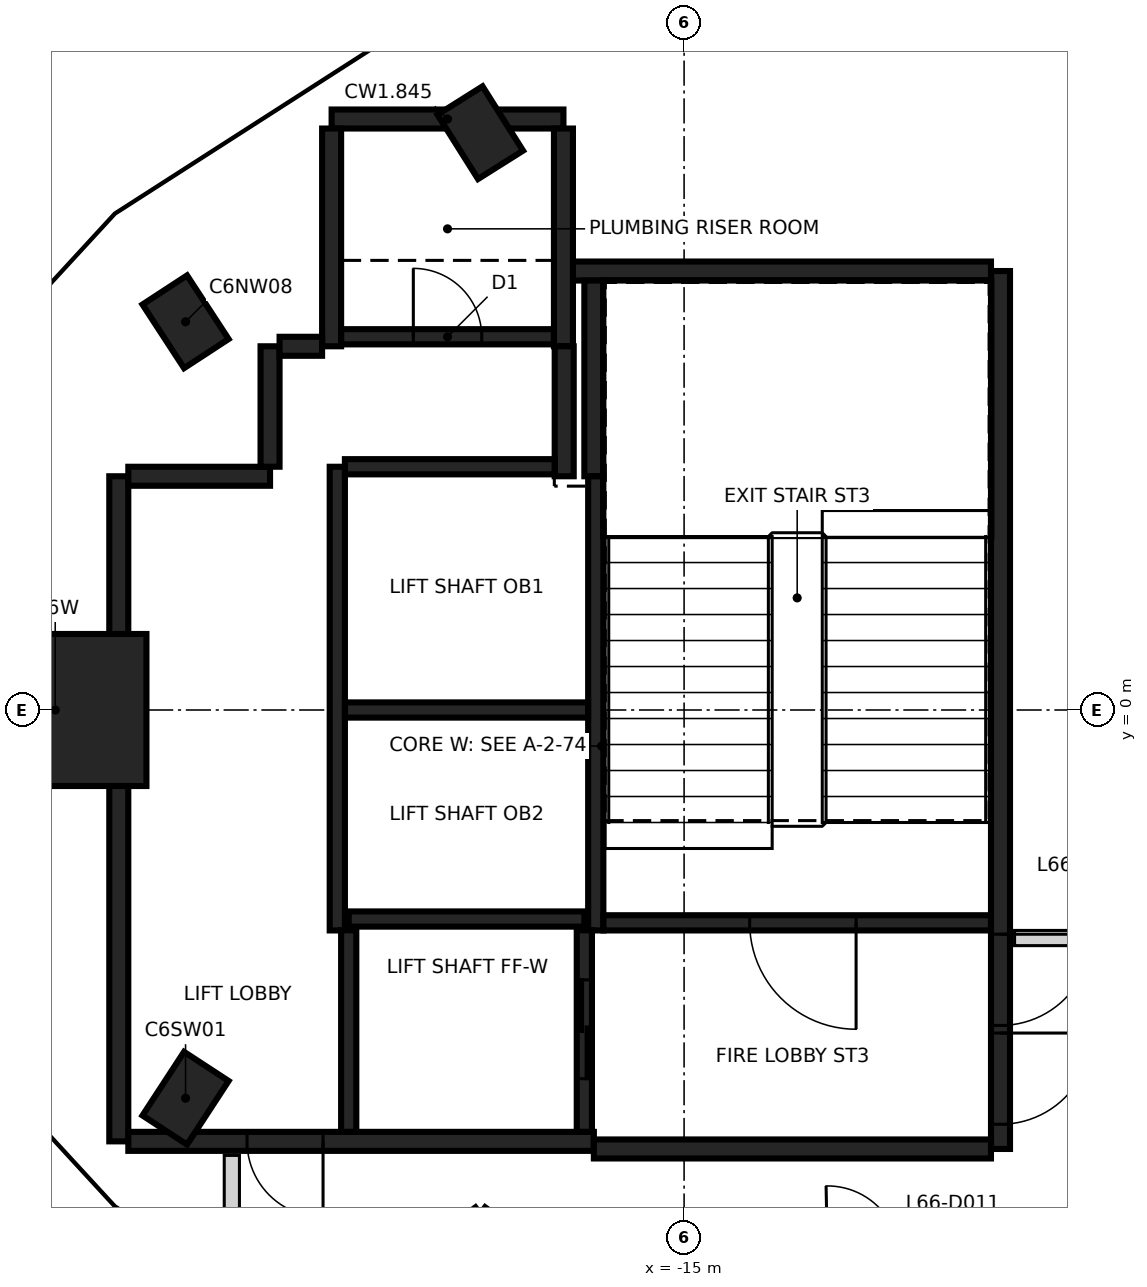
"""IFC4 building model, lengths in metres.
Left out: names, types, materials, properties, quantities, classifications, styles, units other than length and angle.
Written with IfcOpenShell. Run it as: python <this file> out.ifc"""

import sys

from ifc_helpers import new_model, si_unit, direction, frame, frame_2d, origin, origin_2d, place, context, subcontext, project, spatial, rectangle, extrude, element, fill, save


model = new_model("IFC4")
c1 = context("Model", 3, precision=1e-05, world=origin(), true_north=direction((0.0, 1.0)))
c2 = subcontext(c1, "Body", "Model", "MODEL_VIEW")
j1 = project(units=[si_unit("LENGTHUNIT", "METRE"), si_unit("PLANEANGLEUNIT", "RADIAN")], contexts=[c1])
p1 = place(None, origin())
s1 = spatial("IfcSite", under=j1, at=p1, CompositionType="ELEMENT")
p2 = place(p1, origin())
s2 = spatial("IfcBuilding", under=s1, at=p2, CompositionType="ELEMENT")
p3 = place(p2, frame((0.0, 0.0, 262.2)))
s3 = spatial("IfcBuildingStorey", under=s2, at=p3, CompositionType="ELEMENT", Elevation=262.2)
for number, where, z_axis, x_axis in (
    (1, (-17.681, 7.595, -0.35), (0.0, 0.0, 1.0), (-0.533, 0.846, 0.0)),
    (2, (-21.559, 5.107, -0.35), (0.0, 0.0, 1.0), (-0.547, 0.837, 0.0)),
    (3, (-21.559, -5.107, -0.35), (0.0, 0.0, 1.0), (0.547, 0.837, 0.0)),
):
    element("IfcColumn", number, at=place(p3, frame(where, z_axis=z_axis, x_axis=x_axis)), inside=s3, PredefinedType="COLUMN", context=c2, shape_type="SweptSolid", body=[
        extrude(rectangle(XDim=1.0, YDim=0.7, at=origin_2d()), origin(), (0.0, 0.0, 1.0), 3.6),
    ])
p4 = place(p3, frame((-23.273, 0.0, -0.35), z_axis=(0.0, 0.0, 1.0), x_axis=(1.0, 0.0, 0.0)))
e4 = element("IfcColumn", 4, at=p4, inside=s3, PredefinedType="COLUMN", context=c2, shape_type="SweptSolid", body=[
    extrude(rectangle(XDim=2.4, YDim=2.0, at=origin_2d()), origin(), (0.0, 0.0, 1.0), 3.6),
])
p5 = place(p3, frame((-10.837, 5.775, 0.0), z_axis=(0.0, 0.0, 1.0), x_axis=(0.0, -1.0, 0.0)))
e5 = element("IfcWall", 5, at=p5, inside=s3, PredefinedType="SHEAR", context=c2, shape_type="SweptSolid", body=[
    extrude(rectangle(XDim=11.55, YDim=0.25, at=frame_2d((5.775, 0.0))), origin(), (0.0, 0.0, 1.0), 3.25),
])
p6 = place(p5, frame((10.025, 0.0, 0.0)))
e6 = element("IfcOpeningElement", 6, at=p6, cuts=e5, PredefinedType="OPENING", context=c2, shape_type="SweptSolid", body=[
    extrude(rectangle(XDim=1.2, YDim=2.1, at=frame_2d((0.6, 1.05))), frame((0.0, 0.135, 0.0), z_axis=(0.0, -1.0, 0.0), x_axis=(1.0, 0.0, 0.0)), (0.0, 0.0, 1.0), 0.27),
])
p7 = place(p5, frame((8.725, 0.0, 0.0)))
e7 = element("IfcOpeningElement", 7, at=p7, cuts=e5, PredefinedType="OPENING", context=c2, shape_type="SweptSolid", body=[
    extrude(rectangle(XDim=1.2, YDim=2.1, at=frame_2d((0.6, 1.05))), frame((0.0, 0.135, 0.0), z_axis=(0.0, -1.0, 0.0), x_axis=(1.0, 0.0, 0.0)), (0.0, 0.0, 1.0), 0.27),
])
p8 = place(p3, frame((-22.437, -5.675, 0.0), z_axis=(0.0, 0.0, 1.0), x_axis=(0.0, 1.0, 0.0)))
e8 = element("IfcWall", 8, at=p8, inside=s3, PredefinedType="SHEAR", context=c2, shape_type="SweptSolid", body=[
    extrude(rectangle(XDim=8.75, YDim=0.25, at=frame_2d((4.375, 0.0))), origin(), (0.0, 0.0, 1.0), 3.25),
])
p9 = place(p3, frame((-16.187, -5.675, 0.0), z_axis=(0.0, 0.0, 1.0), x_axis=(-1.0, 0.0, 0.0)))
e9 = element("IfcWall", 9, at=p9, inside=s3, PredefinedType="SHEAR", context=c2, shape_type="SweptSolid", body=[
    extrude(rectangle(XDim=6.125, YDim=0.25, at=frame_2d((3.062, 0.0))), origin(), (0.0, 0.0, 1.0), 3.25),
])
p10 = place(p9, frame((3.563, 0.0, 0.0)))
e10 = element("IfcOpeningElement", 10, at=p10, cuts=e9, PredefinedType="OPENING", context=c2, shape_type="SweptSolid", body=[
    extrude(rectangle(XDim=1.0, YDim=2.1, at=frame_2d((0.5, 1.05))), frame((0.0, 0.135, 0.0), z_axis=(0.0, -1.0, 0.0), x_axis=(1.0, 0.0, 0.0)), (0.0, 0.0, 1.0), 0.27),
])
p11 = place(p3, frame((-10.963, -5.775, 0.0), z_axis=(0.0, 0.0, 1.0), x_axis=(-1.0, 0.0, 0.0)))
e11 = element("IfcWall", 11, at=p11, inside=s3, PredefinedType="SHEAR", context=c2, shape_type="SweptSolid", body=[
    extrude(rectangle(XDim=5.225, YDim=0.25, at=frame_2d((2.612, 0.0))), origin(), (0.0, 0.0, 1.0), 3.25),
])
p12 = place(p3, frame((-16.472, 5.775, 0.0), z_axis=(0.0, 0.0, 1.0), x_axis=(1.0, 0.0, 0.0)))
e12 = element("IfcWall", 12, at=p12, inside=s3, PredefinedType="SHEAR", context=c2, shape_type="SweptSolid", body=[
    extrude(rectangle(XDim=5.51, YDim=0.25, at=frame_2d((2.755, 0.0))), origin(), (0.0, 0.0, 1.0), 3.25),
])
p13 = place(p3, frame((-19.637, 7.775, 0.0), z_axis=(0.0, 0.0, 1.0), x_axis=(1.0, 0.0, 0.0)))
e13 = element("IfcWall", 13, at=p13, inside=s3, PredefinedType="SHEAR", context=c2, shape_type="SweptSolid", body=[
    extrude(rectangle(XDim=3.05, YDim=0.25, at=frame_2d((1.525, 0.0))), origin(), (0.0, 0.0, 1.0), 3.25),
])
for number, where, z_axis, x_axis in (
    (14, (-16.587, 7.65, 0.0), (0.0, 0.0, 1.0), (0.0, -1.0, 0.0)),
    (15, (-19.637, 4.785, 0.0), (0.0, 0.0, 1.0), (0.0, 1.0, 0.0)),
):
    element("IfcWall", number, at=place(p3, frame(where, z_axis=z_axis, x_axis=x_axis)), inside=s3, PredefinedType="SHEAR", context=c2, shape_type="SweptSolid", body=[
        extrude(rectangle(XDim=2.865, YDim=0.25, at=frame_2d((1.432, 0.0))), origin(), (0.0, 0.0, 1.0), 3.25),
    ])
p14 = place(p3, frame((-16.187, 3.075, 0.0), z_axis=(0.0, 0.0, 1.0), x_axis=(0.0, 1.0, 0.0)))
e16 = element("IfcWall", 16, at=p14, inside=s3, PredefinedType="SHEAR", context=c2, shape_type="SweptSolid", body=[
    extrude(rectangle(XDim=2.575, YDim=0.25, at=frame_2d((1.287, 0.0))), origin(), (0.0, 0.0, 1.0), 3.25),
])
p15 = place(p3, frame((-22.312, 3.075, 0.0), z_axis=(0.0, 0.0, 1.0), x_axis=(1.0, 0.0, 0.0)))
e17 = element("IfcWall", 17, at=p15, inside=s3, PredefinedType="SHEAR", context=c2, shape_type="SweptSolid", body=[
    extrude(rectangle(XDim=1.865, YDim=0.25, at=frame_2d((0.932, 0.0))), origin(), (0.0, 0.0, 1.0), 3.25),
])
p16 = place(p3, frame((-16.577, 4.785, 0.0), z_axis=(0.0, 0.0, 1.0), x_axis=(0.0, -1.0, 0.0)))
e18 = element("IfcWall", 18, at=p16, inside=s3, PredefinedType="SHEAR", context=c2, shape_type="SweptSolid", body=[
    extrude(rectangle(XDim=1.71, YDim=0.25, at=frame_2d((0.855, 0.0))), origin(), (0.0, 0.0, 1.0), 3.25),
])
p17 = place(p3, frame((-20.447, 3.2, 0.0), z_axis=(0.0, 0.0, 1.0), x_axis=(0.0, 1.0, 0.0)))
e19 = element("IfcWall", 19, at=p17, inside=s3, PredefinedType="SHEAR", context=c2, shape_type="SweptSolid", body=[
    extrude(rectangle(XDim=1.584, YDim=0.25, at=frame_2d((0.792, 0.0))), origin(), (0.0, 0.0, 1.0), 3.25),
])
p18 = place(p3, frame((-20.322, 4.785, 0.0), z_axis=(0.0, 0.0, 1.0), x_axis=(1.0, 0.0, 0.0)))
e20 = element("IfcWall", 20, at=p18, inside=s3, PredefinedType="SHEAR", context=c2, shape_type="SweptSolid", body=[
    extrude(rectangle(XDim=0.559, YDim=0.25, at=frame_2d((0.28, 0.0))), origin(), (0.0, 0.0, 1.0), 3.25),
])
p19 = place(p3, frame((-16.162, 3.074, 0.0), z_axis=(0.0, 0.0, 1.0), x_axis=(0.0, -1.0, 0.0)))
e21 = element("IfcWall", 21, at=p19, inside=s3, PredefinedType="SHEAR", context=c2, shape_type="SweptSolid", body=[
    extrude(rectangle(XDim=5.974, YDim=0.2, at=frame_2d((2.987, 0.0))), origin(), (0.0, 0.0, 1.0), 3.25),
])
p20 = place(p3, frame((-19.562, -2.9, 0.0), z_axis=(0.0, 0.0, 1.0), x_axis=(0.0, 1.0, 0.0)))
e22 = element("IfcWall", 22, at=p20, inside=s3, PredefinedType="SHEAR", context=c2, shape_type="SweptSolid", body=[
    extrude(rectangle(XDim=6.1, YDim=0.2, at=frame_2d((3.05, 0.0))), origin(), (0.0, 0.0, 1.0), 3.25),
])
p21 = place(p3, frame((-10.963, -2.8, 0.0), z_axis=(0.0, 0.0, 1.0), x_axis=(-1.0, 0.0, 0.0)))
e23 = element("IfcWall", 23, at=p21, inside=s3, PredefinedType="SHEAR", context=c2, shape_type="SweptSolid", body=[
    extrude(rectangle(XDim=5.098, YDim=0.2, at=frame_2d((2.549, 0.0))), origin(), (0.0, 0.0, 1.0), 3.25),
])
p22 = place(p21, frame((1.774, 0.0, 0.0)))
e24 = element("IfcOpeningElement", 24, at=p22, cuts=e23, PredefinedType="OPENING", context=c2, shape_type="SweptSolid", body=[
    extrude(rectangle(XDim=1.4, YDim=2.1, at=frame_2d((0.7, 1.05))), frame((0.0, 0.11, 0.0), z_axis=(0.0, -1.0, 0.0), x_axis=(1.0, 0.0, 0.0)), (0.0, 0.0, 1.0), 0.22),
])
p23 = place(p3, frame((-16.263, 0.0, 0.0), z_axis=(0.0, 0.0, 1.0), x_axis=(-1.0, 0.0, 0.0)))
e25 = element("IfcWall", 25, at=p23, inside=s3, PredefinedType="SHEAR", context=c2, shape_type="SweptSolid", body=[
    extrude(rectangle(XDim=3.198, YDim=0.2, at=frame_2d((1.599, 0.0))), origin(), (0.0, 0.0, 1.0), 3.25),
])
p24 = place(p3, frame((-19.511, 4.91, 0.0), z_axis=(0.0, 0.0, 1.0), x_axis=(1.0, 0.0, 0.0)))
e26 = element("IfcWall", 26, at=p24, inside=s3, PredefinedType="SHEAR", context=c2, shape_type="SweptSolid", body=[
    extrude(rectangle(XDim=2.798, YDim=0.2, at=frame_2d((1.399, 0.0))), origin(), (0.0, 0.0, 1.0), 3.25),
])
p25 = place(p24, frame((0.949, 0.0, 0.0)))
e27 = element("IfcOpeningElement", 27, at=p25, cuts=e26, PredefinedType="OPENING", context=c2, shape_type="SweptSolid", body=[
    extrude(rectangle(XDim=0.9, YDim=2.1, at=frame_2d((0.45, 1.05))), frame((0.0, 0.11, 0.0), z_axis=(0.0, -1.0, 0.0), x_axis=(1.0, 0.0, 0.0)), (0.0, 0.0, 1.0), 0.22),
])
p26 = place(p3, frame((-19.462, 3.2, 0.0), z_axis=(0.0, 0.0, 1.0), x_axis=(1.0, 0.0, 0.0)))
e28 = element("IfcWall", 28, at=p26, inside=s3, PredefinedType="SHEAR", context=c2, shape_type="SweptSolid", body=[
    extrude(rectangle(XDim=2.759, YDim=0.2, at=frame_2d((1.379, 0.0))), origin(), (0.0, 0.0, 1.0), 3.25),
])
p27 = place(p3, frame((-19.412, -2.75, 0.0), z_axis=(0.0, 0.0, 1.0), x_axis=(1.0, 0.0, 0.0)))
e29 = element("IfcWall", 29, at=p27, inside=s3, PredefinedType="SHEAR", context=c2, shape_type="SweptSolid", body=[
    extrude(rectangle(XDim=3.1, YDim=0.2, at=frame_2d((1.55, 0.0))), origin(), (0.0, 0.0, 1.0), 3.25),
])
p28 = place(p3, frame((-16.312, -2.898, 0.0), z_axis=(0.0, 0.0, 1.0), x_axis=(0.0, -1.0, 0.0)))
e30 = element("IfcWall", 30, at=p28, inside=s3, PredefinedType="SHEAR", context=c2, shape_type="SweptSolid", body=[
    extrude(rectangle(XDim=2.651, YDim=0.2, at=frame_2d((1.325, 0.0))), origin(), (0.0, 0.0, 1.0), 3.25),
])
p29 = place(p28, frame((0.652, 0.0, 0.0)))
e31 = element("IfcOpeningElement", 31, at=p29, cuts=e30, PredefinedType="OPENING", context=c2, shape_type="SweptSolid", body=[
    extrude(rectangle(XDim=1.3, YDim=2.1, at=frame_2d((0.65, 1.05))), frame((0.0, 0.11, 0.0), z_axis=(0.0, -1.0, 0.0), x_axis=(1.0, 0.0, 0.0)), (0.0, 0.0, 1.0), 0.22),
])
p30 = place(p3, frame((-19.412, -5.549, 0.0), z_axis=(0.0, 0.0, 1.0), x_axis=(0.0, 1.0, 0.0)))
e32 = element("IfcWall", 32, at=p30, inside=s3, PredefinedType="SHEAR", context=c2, shape_type="SweptSolid", body=[
    extrude(rectangle(XDim=2.651, YDim=0.2, at=frame_2d((1.325, 0.0))), origin(), (0.0, 0.0, 1.0), 3.25),
])
p31 = place(p3, frame((-20.95, -6.65, 0.0), z_axis=(0.0, 0.0, 1.0), x_axis=(0.0, 1.0, 0.0)))
e33 = element("IfcWall", 33, at=p31, inside=s3, PredefinedType="PARTITIONING", context=c2, shape_type="SweptSolid", body=[
    extrude(rectangle(XDim=0.79, YDim=0.2, at=frame_2d((0.395, 0.0))), origin(), (0.0, 0.0, 1.0), 3.25),
])
p32 = place(p3, frame((-18.642, -7.319, 0.0), z_axis=(0.0, 0.0, 1.0), x_axis=(0.798707882989, 0.601718968998, 0.0)))
e34 = element("IfcWall", 34, at=p32, inside=s3, PredefinedType="PARTITIONING", context=c2, shape_type="SweptSolid", body=[
    extrude(rectangle(XDim=1.203, YDim=0.2, at=frame_2d((0.602, 0.0))), origin(), (0.0, 0.0, 1.0), 2.35),
])
p33 = place(p3, frame((-17.681, -6.595, 0.0), z_axis=(0.0, 0.0, 1.0), x_axis=(0.810123213102, -0.586259652026, 0.0)))
e35 = element("IfcWall", 35, at=p33, inside=s3, PredefinedType="PARTITIONING", context=c2, shape_type="SweptSolid", body=[
    extrude(rectangle(XDim=1.17, YDim=0.2, at=frame_2d((0.585, 0.0))), origin(), (0.0, 0.0, 1.0), 3.25),
])
p34 = place(p3, frame((-10.652, -3.0, 0.0), z_axis=(0.0, 0.0, 1.0), x_axis=(1.0, 0.0, 0.0)))
e36 = element("IfcWall", 36, at=p34, inside=s3, PredefinedType="PARTITIONING", context=c2, shape_type="SweptSolid", body=[
    extrude(rectangle(XDim=0.994, YDim=0.2, at=frame_2d((0.497, 0.0))), origin(), (0.0, 0.0, 1.0), 3.25),
])
p35 = place(p3, frame((-10.023, -7.151, 0.0), z_axis=(0.0, 0.0, 1.0), x_axis=(0.668886243279, 0.743364778256, 0.0)))
e37 = element("IfcWall", 37, at=p35, inside=s3, PredefinedType="PARTITIONING", context=c2, shape_type="SweptSolid", body=[
    extrude(rectangle(XDim=3.609, YDim=0.2, at=frame_2d((1.805, 0.0))), origin(), (0.0, 0.0, 1.0), 3.25),
])
p36 = place(p29, origin())
e38 = element("IfcDoor", 38, at=p36, inside=s3, OperationType="SLIDING_TO_LEFT", PredefinedType="DOOR", context=c2, shape_type="SweptSolid", body=[
    extrude(rectangle(XDim=1.3, YDim=2.1, at=frame_2d((0.65, 1.05))), frame((0.0, 0.025, 0.0), z_axis=(0.0, -1.0, 0.0), x_axis=(1.0, 0.0, 0.0)), (0.0, 0.0, 1.0), 0.05),
])
fill(e31, e38)
p37 = place(p10, origin())
e39 = element("IfcDoor", 39, at=p37, inside=s3, OperationType="SINGLE_SWING_LEFT", PredefinedType="DOOR", context=c2, shape_type="SweptSolid", body=[
    extrude(rectangle(XDim=1.0, YDim=2.1, at=frame_2d((0.5, 1.05))), frame((0.0, 0.025, 0.0), z_axis=(0.0, -1.0, 0.0), x_axis=(1.0, 0.0, 0.0)), (0.0, 0.0, 1.0), 0.05),
])
fill(e10, e39)
p38 = place(p6, origin())
e40 = element("IfcDoor", 40, at=p38, inside=s3, OperationType="SINGLE_SWING_LEFT", PredefinedType="DOOR", context=c2, shape_type="SweptSolid", body=[
    extrude(rectangle(XDim=1.2, YDim=2.1, at=frame_2d((0.6, 1.05))), frame((0.0, 0.025, 0.0), z_axis=(0.0, -1.0, 0.0), x_axis=(1.0, 0.0, 0.0)), (0.0, 0.0, 1.0), 0.05),
])
fill(e6, e40)
p39 = place(p7, origin())
e41 = element("IfcDoor", 41, at=p39, inside=s3, OperationType="SINGLE_SWING_RIGHT", PredefinedType="DOOR", context=c2, shape_type="SweptSolid", body=[
    extrude(rectangle(XDim=1.2, YDim=2.1, at=frame_2d((0.6, 1.05))), frame((0.0, 0.025, 0.0), z_axis=(0.0, -1.0, 0.0), x_axis=(1.0, 0.0, 0.0)), (0.0, 0.0, 1.0), 0.05),
])
fill(e7, e41)
p40 = place(p22, origin())
e42 = element("IfcDoor", 42, at=p40, inside=s3, OperationType="SINGLE_SWING_LEFT", PredefinedType="DOOR", context=c2, shape_type="SweptSolid", body=[
    extrude(rectangle(XDim=1.4, YDim=2.1, at=frame_2d((0.7, 1.05))), frame((0.0, 0.025, 0.0), z_axis=(0.0, -1.0, 0.0), x_axis=(1.0, 0.0, 0.0)), (0.0, 0.0, 1.0), 0.05),
])
fill(e24, e42)
p41 = place(p25, origin())
e43 = element("IfcDoor", 43, at=p41, inside=s3, OperationType="SINGLE_SWING_RIGHT", PredefinedType="DOOR", context=c2, shape_type="SweptSolid", body=[
    extrude(rectangle(XDim=0.9, YDim=2.1, at=frame_2d((0.45, 1.05))), frame((0.0, 0.025, 0.0), z_axis=(0.0, -1.0, 0.0), x_axis=(1.0, 0.0, 0.0)), (0.0, 0.0, 1.0), 0.05),
])
fill(e27, e43)
save(model, sys.argv[1])
